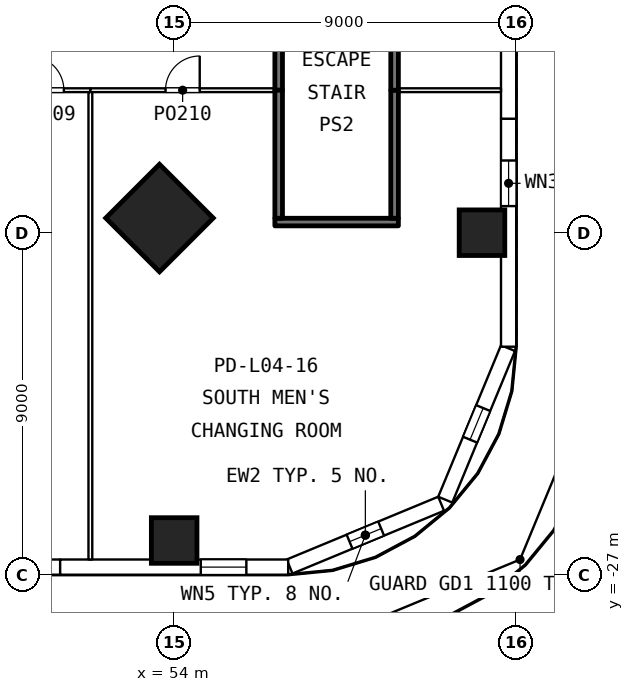
"""IFC4 building model, lengths in metres.
Left out: names, types, materials, properties, quantities, classifications, styles, units other than length and angle.
Written with IfcOpenShell. Run it as: python <this file> out.ifc"""

import sys

from ifc_helpers import new_model, si_unit, direction, frame, frame_2d, origin, origin_2d, place, context, subcontext, project, spatial, rectangle, extrude, element, fill, save


model = new_model("IFC4")
c1 = context("Model", 3, precision=1e-05, world=origin(), true_north=direction((0.0, 1.0)))
c2 = subcontext(c1, "Body", "Model", "MODEL_VIEW")
j1 = project(units=[si_unit("LENGTHUNIT", "METRE"), si_unit("PLANEANGLEUNIT", "RADIAN")], contexts=[c1])
p1 = place(None, origin())
s1 = spatial("IfcSite", under=j1, at=p1, CompositionType="ELEMENT")
p2 = place(p1, origin())
s2 = spatial("IfcBuilding", under=s1, at=p2, CompositionType="ELEMENT")
p3 = place(p2, frame((0.0, 0.0, 22.8)))
s3 = spatial("IfcBuildingStorey", under=s2, at=p3, CompositionType="ELEMENT", Elevation=22.8)
for number, where, z_axis, x_axis in (
    (1, (54.0, -26.1, 0.0), (0.0, 0.0, 1.0), (1.0, 0.0, 0.0)),
    (2, (62.1, -18.0, 0.0), (0.0, 0.0, 1.0), (1.0, 0.0, 0.0)),
):
    element("IfcColumn", number, at=place(p3, frame(where, z_axis=z_axis, x_axis=x_axis)), inside=s3, PredefinedType="COLUMN", context=c2, shape_type="SweptSolid", body=[
        extrude(rectangle(XDim=1.2, YDim=1.2, at=origin_2d()), origin(), (0.0, 0.0, 1.0), 4.8),
    ])
p4 = place(p3, frame((53.614, -17.614, 0.0), z_axis=(0.0, 0.0, 1.0), x_axis=(0.707106781187, -0.707106781187, 0.0)))
e3 = element("IfcColumn", 3, at=p4, inside=s3, PredefinedType="COLUMN", context=c2, shape_type="SweptSolid", body=[
    extrude(rectangle(XDim=2.0, YDim=2.0, at=origin_2d()), origin(), (0.0, 0.0, 1.0), 4.8),
])
p5 = place(p3, frame((57.037, -26.785, 0.0), z_axis=(0.0, 0.0, 1.0), x_axis=(0.923854820772, 0.382743086333, 0.0)))
e4 = element("IfcWall", 4, at=p5, inside=s3, PredefinedType="SOLIDWALL", context=c2, shape_type="SweptSolid", body=[
    extrude(rectangle(XDim=4.316, YDim=0.4, at=frame_2d((2.158, 0.0))), origin(), (0.0, 0.0, 1.0), 4.5),
])
p6 = place(p5, frame((1.708, 0.0, 1.0)))
e5 = element("IfcOpeningElement", 5, at=p6, cuts=e4, PredefinedType="OPENING", context=c2, shape_type="SweptSolid", body=[
    extrude(rectangle(XDim=0.9, YDim=2.4, at=frame_2d((0.45, 1.2))), frame((0.0, 0.21, 0.0), z_axis=(0.0, -1.0, 0.0), x_axis=(1.0, 0.0, 0.0)), (0.0, 0.0, 1.0), 0.42),
])
p7 = place(p3, frame((61.133, -25.025, 0.0), z_axis=(0.0, 0.0, 1.0), x_axis=(0.382743086333, 0.923854820772, 0.0)))
e6 = element("IfcWall", 6, at=p7, inside=s3, PredefinedType="SOLIDWALL", context=c2, shape_type="SweptSolid", body=[
    extrude(rectangle(XDim=4.316, YDim=0.4, at=frame_2d((2.158, 0.0))), origin(), (0.0, 0.0, 1.0), 4.5),
])
p8 = place(p7, frame((1.708, 0.0, 1.0)))
e7 = element("IfcOpeningElement", 7, at=p8, cuts=e6, PredefinedType="OPENING", context=c2, shape_type="SweptSolid", body=[
    extrude(rectangle(XDim=0.9, YDim=2.4, at=frame_2d((0.45, 1.2))), frame((0.0, 0.21, 0.0), z_axis=(0.0, -1.0, 0.0), x_axis=(1.0, 0.0, 0.0)), (0.0, 0.0, 1.0), 0.42),
])
p9 = place(p3, frame((62.8, -21.0, 0.0), z_axis=(0.0, 0.0, 1.0), x_axis=(0.0, 1.0, 0.0)))
e8 = element("IfcWall", 8, at=p9, inside=s3, PredefinedType="SOLIDWALL", context=c2, shape_type="SweptSolid", body=[
    extrude(rectangle(XDim=6.0, YDim=0.4, at=frame_2d((3.0, 0.0))), origin(), (0.0, 0.0, 1.0), 4.5),
])
p10 = place(p9, frame((3.7, 0.0, 1.1)))
e9 = element("IfcOpeningElement", 9, at=p10, cuts=e8, PredefinedType="OPENING", context=c2, shape_type="SweptSolid", body=[
    extrude(rectangle(XDim=1.2, YDim=1.8, at=frame_2d((0.6, 0.9))), frame((0.0, 0.21, 0.0), z_axis=(0.0, -1.0, 0.0), x_axis=(1.0, 0.0, 0.0)), (0.0, 0.0, 1.0), 0.42),
])
p11 = place(p3, frame((62.8, -15.0, 0.0), z_axis=(0.0, 0.0, 1.0), x_axis=(0.0, 1.0, 0.0)))
e10 = element("IfcWall", 10, at=p11, inside=s3, PredefinedType="SOLIDWALL", context=c2, shape_type="SweptSolid", body=[
    extrude(rectangle(XDim=6.0, YDim=0.4, at=frame_2d((3.0, 0.0))), origin(), (0.0, 0.0, 1.0), 4.5),
])
p12 = place(p11, frame((2.4, 0.0, 1.1)))
e11 = element("IfcOpeningElement", 11, at=p12, cuts=e10, PredefinedType="OPENING", context=c2, shape_type="SweptSolid", body=[
    extrude(rectangle(XDim=1.2, YDim=1.8, at=frame_2d((0.6, 0.9))), frame((0.0, 0.21, 0.0), z_axis=(0.0, -1.0, 0.0), x_axis=(1.0, 0.0, 0.0)), (0.0, 0.0, 1.0), 0.42),
])
p13 = place(p3, frame((45.0, -26.8, 0.0), z_axis=(0.0, 0.0, 1.0), x_axis=(1.0, 0.0, 0.0)))
e12 = element("IfcWall", 12, at=p13, inside=s3, PredefinedType="SOLIDWALL", context=c2, shape_type="SweptSolid", body=[
    extrude(rectangle(XDim=6.0, YDim=0.4, at=frame_2d((3.0, 0.0))), origin(), (0.0, 0.0, 1.0), 4.5),
])
p14 = place(p3, frame((51.0, -26.8, 0.0), z_axis=(0.0, 0.0, 1.0), x_axis=(1.0, 0.0, 0.0)))
e13 = element("IfcWall", 13, at=p14, inside=s3, PredefinedType="SOLIDWALL", context=c2, shape_type="SweptSolid", body=[
    extrude(rectangle(XDim=6.0, YDim=0.4, at=frame_2d((3.0, 0.0))), origin(), (0.0, 0.0, 1.0), 4.5),
])
p15 = place(p14, frame((3.7, 0.0, 1.1)))
e14 = element("IfcOpeningElement", 14, at=p15, cuts=e13, PredefinedType="OPENING", context=c2, shape_type="SweptSolid", body=[
    extrude(rectangle(XDim=1.2, YDim=1.8, at=frame_2d((0.6, 0.9))), frame((0.0, 0.21, 0.0), z_axis=(0.0, -1.0, 0.0), x_axis=(1.0, 0.0, 0.0)), (0.0, 0.0, 1.0), 0.42),
])
p16 = place(p3, frame((56.75, -14.25, 0.0), z_axis=(0.0, 0.0, 1.0), x_axis=(0.0, 1.0, 0.0)))
e15 = element("IfcWall", 15, at=p16, inside=s3, PredefinedType="SOLIDWALL", context=c2, shape_type="SweptSolid", body=[
    extrude(rectangle(XDim=2.4, YDim=0.2, at=frame_2d((1.2, 0.0))), origin(), (0.0, 0.0, 1.0), 4.5),
])
p17 = place(p3, frame((56.65, -17.72, 0.0), z_axis=(0.0, 0.0, 1.0), x_axis=(1.0, 0.0, 0.0)))
e16 = element("IfcWall", 16, at=p17, inside=s3, PredefinedType="SOLIDWALL", context=c2, shape_type="SweptSolid", body=[
    extrude(rectangle(XDim=3.25, YDim=0.2, at=frame_2d((1.625, 0.0))), origin(), (0.0, 0.0, 1.0), 4.5),
])
for number, where, z_axis, x_axis in (
    (17, (56.75, -17.62, 0.0), (0.0, 0.0, 1.0), (0.0, 1.0, 0.0)),
    (18, (59.8, -17.62, 0.0), (0.0, 0.0, 1.0), (0.0, 1.0, 0.0)),
):
    element("IfcWall", number, at=place(p3, frame(where, z_axis=z_axis, x_axis=x_axis)), inside=s3, PredefinedType="SOLIDWALL", context=c2, shape_type="SweptSolid", body=[
        extrude(rectangle(XDim=3.37, YDim=0.2, at=frame_2d((1.685, 0.0))), origin(), (0.0, 0.0, 1.0), 4.5),
    ])
p18 = place(p3, frame((59.8, -14.25, 0.0), z_axis=(0.0, 0.0, 1.0), x_axis=(0.0, 1.0, 0.0)))
e19 = element("IfcWall", 19, at=p18, inside=s3, PredefinedType="SOLIDWALL", context=c2, shape_type="SweptSolid", body=[
    extrude(rectangle(XDim=3.285, YDim=0.2, at=frame_2d((1.643, 0.0))), origin(), (0.0, 0.0, 1.0), 4.5),
])
p19 = place(p3, frame((49.5, -14.25, 0.0), z_axis=(0.0, 0.0, 1.0), x_axis=(1.0, 0.0, 0.0)))
e20 = element("IfcWall", 20, at=p19, inside=s3, PredefinedType="PARTITIONING", context=c2, shape_type="SweptSolid", body=[
    extrude(rectangle(XDim=2.295, YDim=0.1, at=frame_2d((1.147, 0.0))), origin(), (0.0, 0.0, 1.0), 4.5),
])
p20 = place(p19, frame((0.698, 0.0, 0.0)))
e21 = element("IfcOpeningElement", 21, at=p20, cuts=e20, PredefinedType="OPENING", context=c2, shape_type="SweptSolid", body=[
    extrude(rectangle(XDim=0.9, YDim=2.1, at=frame_2d((0.45, 1.05))), frame((0.0, 0.06, 0.0), z_axis=(0.0, -1.0, 0.0), x_axis=(1.0, 0.0, 0.0)), (0.0, 0.0, 1.0), 0.12),
])
p21 = place(p3, frame((51.795, -14.25, 0.0), z_axis=(0.0, 0.0, 1.0), x_axis=(1.0, 0.0, 0.0)))
e22 = element("IfcWall", 22, at=p21, inside=s3, PredefinedType="PARTITIONING", context=c2, shape_type="SweptSolid", body=[
    extrude(rectangle(XDim=4.855, YDim=0.1, at=frame_2d((2.427, 0.0))), origin(), (0.0, 0.0, 1.0), 4.5),
])
p22 = place(p21, frame((1.978, 0.0, 0.0)))
e23 = element("IfcOpeningElement", 23, at=p22, cuts=e22, PredefinedType="OPENING", context=c2, shape_type="SweptSolid", body=[
    extrude(rectangle(XDim=0.9, YDim=2.1, at=frame_2d((0.45, 1.05))), frame((0.0, 0.06, 0.0), z_axis=(0.0, -1.0, 0.0), x_axis=(1.0, 0.0, 0.0)), (0.0, 0.0, 1.0), 0.12),
])
p23 = place(p3, frame((51.795, -26.6, 0.0), z_axis=(0.0, 0.0, 1.0), x_axis=(0.0, 1.0, 0.0)))
e24 = element("IfcWall", 24, at=p23, inside=s3, PredefinedType="PARTITIONING", context=c2, shape_type="SweptSolid", body=[
    extrude(rectangle(XDim=12.3, YDim=0.1, at=frame_2d((6.15, 0.0))), origin(), (0.0, 0.0, 1.0), 4.5),
])
p24 = place(p3, frame((59.9, -14.25, 0.0), z_axis=(0.0, 0.0, 1.0), x_axis=(1.0, 0.0, 0.0)))
e25 = element("IfcWall", 25, at=p24, inside=s3, PredefinedType="PARTITIONING", context=c2, shape_type="SweptSolid", body=[
    extrude(rectangle(XDim=2.7, YDim=0.1, at=frame_2d((1.35, 0.0))), origin(), (0.0, 0.0, 1.0), 4.5),
])
p25 = place(p6, origin())
e26 = element("IfcWindow", 26, at=p25, inside=s3, PartitioningType="SINGLE_PANEL", PredefinedType="WINDOW", context=c2, shape_type="SweptSolid", body=[
    extrude(rectangle(XDim=0.9, YDim=2.4, at=frame_2d((0.45, 1.2))), frame((0.0, 0.03, 0.0), z_axis=(0.0, -1.0, 0.0), x_axis=(1.0, 0.0, 0.0)), (0.0, 0.0, 1.0), 0.06),
])
fill(e5, e26)
p26 = place(p8, origin())
e27 = element("IfcWindow", 27, at=p26, inside=s3, PartitioningType="SINGLE_PANEL", PredefinedType="WINDOW", context=c2, shape_type="SweptSolid", body=[
    extrude(rectangle(XDim=0.9, YDim=2.4, at=frame_2d((0.45, 1.2))), frame((0.0, 0.03, 0.0), z_axis=(0.0, -1.0, 0.0), x_axis=(1.0, 0.0, 0.0)), (0.0, 0.0, 1.0), 0.06),
])
fill(e7, e27)
p27 = place(p10, origin())
e28 = element("IfcWindow", 28, at=p27, inside=s3, PartitioningType="SINGLE_PANEL", PredefinedType="WINDOW", context=c2, shape_type="SweptSolid", body=[
    extrude(rectangle(XDim=1.2, YDim=1.8, at=frame_2d((0.6, 0.9))), frame((0.0, 0.03, 0.0), z_axis=(0.0, -1.0, 0.0), x_axis=(1.0, 0.0, 0.0)), (0.0, 0.0, 1.0), 0.06),
])
fill(e9, e28)
p28 = place(p15, origin())
e29 = element("IfcWindow", 29, at=p28, inside=s3, PartitioningType="SINGLE_PANEL", PredefinedType="WINDOW", context=c2, shape_type="SweptSolid", body=[
    extrude(rectangle(XDim=1.2, YDim=1.8, at=frame_2d((0.6, 0.9))), frame((0.0, 0.03, 0.0), z_axis=(0.0, -1.0, 0.0), x_axis=(1.0, 0.0, 0.0)), (0.0, 0.0, 1.0), 0.06),
])
fill(e14, e29)
p29 = place(p20, origin())
e30 = element("IfcDoor", 30, at=p29, inside=s3, OperationType="SINGLE_SWING_LEFT", PredefinedType="DOOR", context=c2, shape_type="SweptSolid", body=[
    extrude(rectangle(XDim=0.9, YDim=2.1, at=frame_2d((0.45, 1.05))), frame((0.0, 0.025, 0.0), z_axis=(0.0, -1.0, 0.0), x_axis=(1.0, 0.0, 0.0)), (0.0, 0.0, 1.0), 0.05),
])
fill(e21, e30)
p30 = place(p22, origin())
e31 = element("IfcDoor", 31, at=p30, inside=s3, OperationType="SINGLE_SWING_RIGHT", PredefinedType="DOOR", context=c2, shape_type="SweptSolid", body=[
    extrude(rectangle(XDim=0.9, YDim=2.1, at=frame_2d((0.45, 1.05))), frame((0.0, 0.025, 0.0), z_axis=(0.0, -1.0, 0.0), x_axis=(1.0, 0.0, 0.0)), (0.0, 0.0, 1.0), 0.05),
])
fill(e23, e31)
save(model, sys.argv[1])
